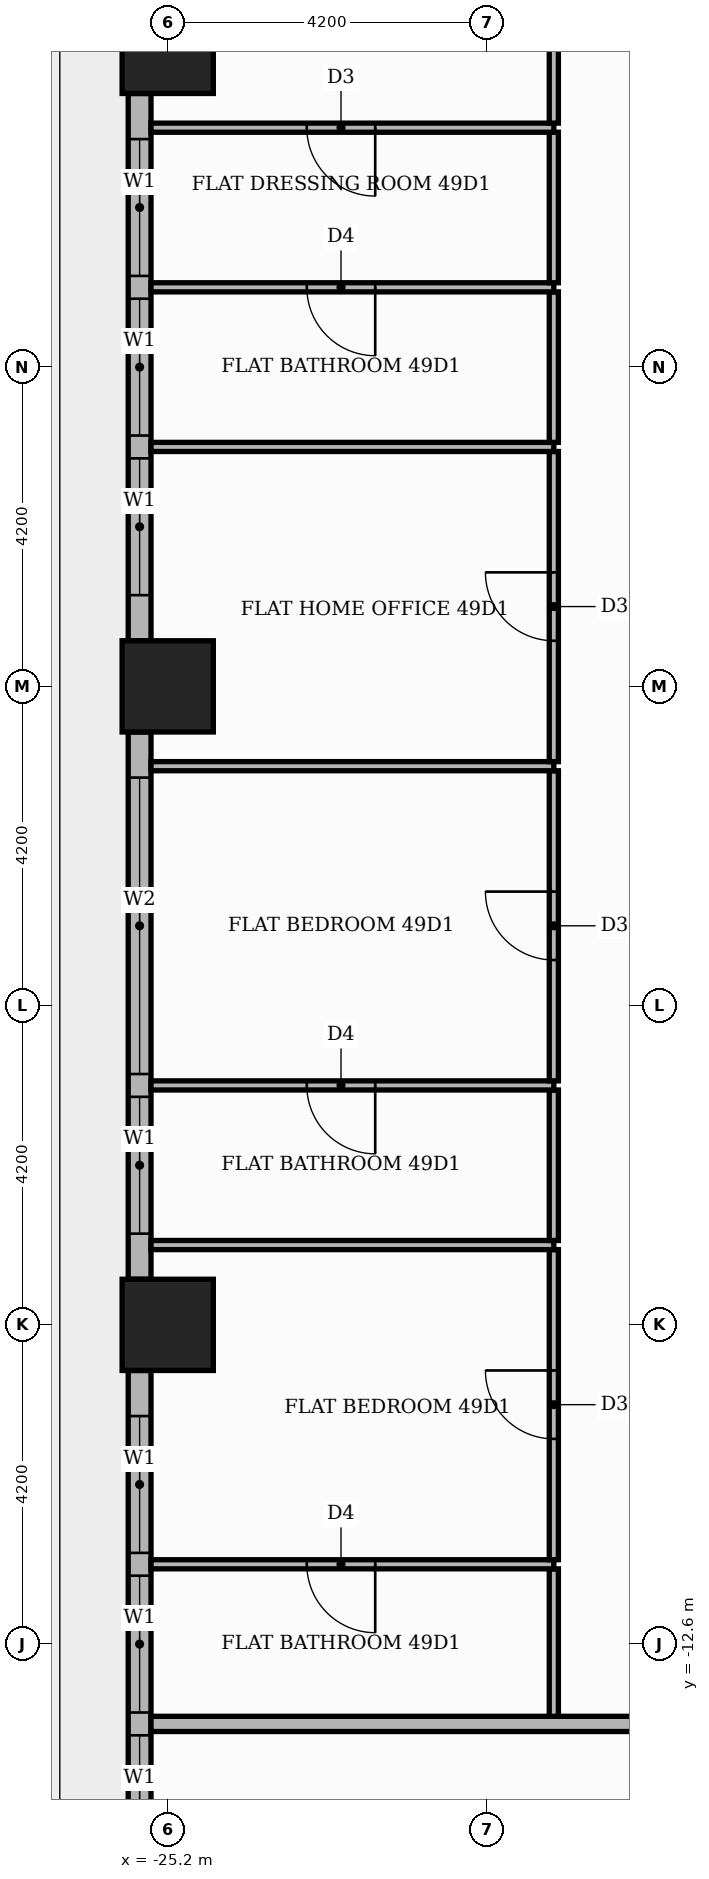
"""IFC4 building model, lengths in metres.
Left out: names, types, materials, properties, quantities, classifications, styles, units other than length and angle.
Written with IfcOpenShell. Run it as: python <this file> out.ifc"""

import sys

from ifc_helpers import new_model, si_unit, direction, frame, frame_2d, origin, origin_2d, place, context, subcontext, project, spatial, rectangle, extrude, element, fill, save


model = new_model("IFC4")
c1 = context("Model", 3, precision=1e-05, world=origin(), true_north=direction((0.0, 1.0)))
c2 = subcontext(c1, "Body", "Model", "MODEL_VIEW")
j1 = project(units=[si_unit("LENGTHUNIT", "METRE"), si_unit("PLANEANGLEUNIT", "RADIAN")], contexts=[c1])
p1 = place(None, origin())
s1 = spatial("IfcSite", under=j1, at=p1, CompositionType="ELEMENT")
p2 = place(p1, origin())
s2 = spatial("IfcBuilding", under=s1, at=p2, CompositionType="ELEMENT")
p3 = place(p2, frame((0.0, 0.0, 207.9)))
s3 = spatial("IfcBuildingStorey", under=s2, at=p3, CompositionType="ELEMENT", Elevation=207.9)
for number, where, z_axis, x_axis in (
    (1, (-25.2, 0.0, 0.0), (0.0, 0.0, 1.0), (1.0, 0.0, 0.0)),
    (2, (-25.2, -8.4, 0.0), (0.0, 0.0, 1.0), (1.0, 0.0, 0.0)),
    (3, (-25.2, 8.4, 0.0), (0.0, 0.0, 1.0), (1.0, 0.0, 0.0)),
):
    element("IfcColumn", number, at=place(p3, frame(where, z_axis=z_axis, x_axis=x_axis)), inside=s3, PredefinedType="COLUMN", context=c2, shape_type="SweptSolid", body=[
        extrude(rectangle(XDim=1.2, YDim=1.2, at=origin_2d()), origin(), (0.0, 0.0, 1.0), 3.9),
    ])
p4 = place(p3, frame((-25.57, 7.8, 0.0), z_axis=(0.0, 0.0, 1.0), x_axis=(0.0, -1.0, 0.0)))
e4 = element("IfcWall", 4, at=p4, inside=s3, PredefinedType="STANDARD", context=c2, shape_type="SweptSolid", body=[
    extrude(rectangle(XDim=7.2, YDim=0.3, at=frame_2d((3.6, 0.0))), origin(), (0.0, 0.0, 1.0), 3.48),
])
p5 = place(p4, frame((0.6, 0.0, 0.9)))
e5 = element("IfcOpeningElement", 5, at=p5, cuts=e4, PredefinedType="OPENING", context=c2, shape_type="SweptSolid", body=[
    extrude(rectangle(XDim=1.8, YDim=2.1, at=frame_2d((0.9, 1.05))), frame((0.0, 0.16, 0.0), z_axis=(0.0, -1.0, 0.0), x_axis=(1.0, 0.0, 0.0)), (0.0, 0.0, 1.0), 0.32),
])
p6 = place(p4, frame((2.7, 0.0, 0.9)))
e6 = element("IfcOpeningElement", 6, at=p6, cuts=e4, PredefinedType="OPENING", context=c2, shape_type="SweptSolid", body=[
    extrude(rectangle(XDim=1.8, YDim=2.1, at=frame_2d((0.9, 1.05))), frame((0.0, 0.16, 0.0), z_axis=(0.0, -1.0, 0.0), x_axis=(1.0, 0.0, 0.0)), (0.0, 0.0, 1.0), 0.32),
])
p7 = place(p4, frame((4.8, 0.0, 0.9)))
e7 = element("IfcOpeningElement", 7, at=p7, cuts=e4, PredefinedType="OPENING", context=c2, shape_type="SweptSolid", body=[
    extrude(rectangle(XDim=1.8, YDim=2.1, at=frame_2d((0.9, 1.05))), frame((0.0, 0.16, 0.0), z_axis=(0.0, -1.0, 0.0), x_axis=(1.0, 0.0, 0.0)), (0.0, 0.0, 1.0), 0.32),
])
p8 = place(p3, frame((-25.57, -0.6, 0.0), z_axis=(0.0, 0.0, 1.0), x_axis=(0.0, -1.0, 0.0)))
e8 = element("IfcWall", 8, at=p8, inside=s3, PredefinedType="STANDARD", context=c2, shape_type="SweptSolid", body=[
    extrude(rectangle(XDim=7.2, YDim=0.3, at=frame_2d((3.6, 0.0))), origin(), (0.0, 0.0, 1.0), 3.48),
])
p9 = place(p8, frame((0.6, 0.0, 0.9)))
e9 = element("IfcOpeningElement", 9, at=p9, cuts=e8, PredefinedType="OPENING", context=c2, shape_type="SweptSolid", body=[
    extrude(rectangle(XDim=3.9, YDim=2.1, at=frame_2d((1.95, 1.05))), frame((0.0, 0.16, 0.0), z_axis=(0.0, -1.0, 0.0), x_axis=(1.0, 0.0, 0.0)), (0.0, 0.0, 1.0), 0.32),
])
p10 = place(p8, frame((4.8, 0.0, 0.9)))
e10 = element("IfcOpeningElement", 10, at=p10, cuts=e8, PredefinedType="OPENING", context=c2, shape_type="SweptSolid", body=[
    extrude(rectangle(XDim=1.8, YDim=2.1, at=frame_2d((0.9, 1.05))), frame((0.0, 0.16, 0.0), z_axis=(0.0, -1.0, 0.0), x_axis=(1.0, 0.0, 0.0)), (0.0, 0.0, 1.0), 0.32),
])
p11 = place(p3, frame((-25.57, -9.0, 0.0), z_axis=(0.0, 0.0, 1.0), x_axis=(0.0, -1.0, 0.0)))
e11 = element("IfcWall", 11, at=p11, inside=s3, PredefinedType="STANDARD", context=c2, shape_type="SweptSolid", body=[
    extrude(rectangle(XDim=7.2, YDim=0.3, at=frame_2d((3.6, 0.0))), origin(), (0.0, 0.0, 1.0), 3.48),
])
p12 = place(p11, frame((0.6, 0.0, 0.9)))
e12 = element("IfcOpeningElement", 12, at=p12, cuts=e11, PredefinedType="OPENING", context=c2, shape_type="SweptSolid", body=[
    extrude(rectangle(XDim=1.8, YDim=2.1, at=frame_2d((0.9, 1.05))), frame((0.0, 0.16, 0.0), z_axis=(0.0, -1.0, 0.0), x_axis=(1.0, 0.0, 0.0)), (0.0, 0.0, 1.0), 0.32),
])
p13 = place(p11, frame((2.7, 0.0, 0.9)))
e13 = element("IfcOpeningElement", 13, at=p13, cuts=e11, PredefinedType="OPENING", context=c2, shape_type="SweptSolid", body=[
    extrude(rectangle(XDim=1.8, YDim=2.1, at=frame_2d((0.9, 1.05))), frame((0.0, 0.16, 0.0), z_axis=(0.0, -1.0, 0.0), x_axis=(1.0, 0.0, 0.0)), (0.0, 0.0, 1.0), 0.32),
])
p14 = place(p11, frame((4.8, 0.0, 0.9)))
e14 = element("IfcOpeningElement", 14, at=p14, cuts=e11, PredefinedType="OPENING", context=c2, shape_type="SweptSolid", body=[
    extrude(rectangle(XDim=1.8, YDim=2.1, at=frame_2d((0.9, 1.05))), frame((0.0, 0.16, 0.0), z_axis=(0.0, -1.0, 0.0), x_axis=(1.0, 0.0, 0.0)), (0.0, 0.0, 1.0), 0.32),
])
p15 = place(p3, frame((-25.42, -13.65, 0.0), z_axis=(0.0, 0.0, 1.0), x_axis=(1.0, 0.0, 0.0)))
e15 = element("IfcWall", 15, at=p15, inside=s3, PredefinedType="PARTITIONING", context=c2, shape_type="SweptSolid", body=[
    extrude(rectangle(XDim=39.07, YDim=0.2, at=frame_2d((19.535, 0.0))), origin(), (0.0, 0.0, 1.0), 3.48),
])
p16 = place(p15, frame((13.32, 0.0, 0.0)))
e16 = element("IfcOpeningElement", 16, at=p16, cuts=e15, PredefinedType="OPENING", context=c2, shape_type="SweptSolid", body=[
    extrude(rectangle(XDim=1.1, YDim=2.4, at=frame_2d((0.55, 1.2))), frame((0.0, 0.11, 0.0), z_axis=(0.0, -1.0, 0.0), x_axis=(1.0, 0.0, 0.0)), (0.0, 0.0, 1.0), 0.22),
])
p17 = place(p15, frame((23.82, 0.0, 0.0)))
e17 = element("IfcOpeningElement", 17, at=p17, cuts=e15, PredefinedType="OPENING", context=c2, shape_type="SweptSolid", body=[
    extrude(rectangle(XDim=1.1, YDim=2.4, at=frame_2d((0.55, 1.2))), frame((0.0, 0.11, 0.0), z_axis=(0.0, -1.0, 0.0), x_axis=(1.0, 0.0, 0.0)), (0.0, 0.0, 1.0), 0.22),
])
p18 = place(p3, frame((-20.12, -13.55, 0.0), z_axis=(0.0, 0.0, 1.0), x_axis=(0.0, 1.0, 0.0)))
e18 = element("IfcWall", 18, at=p18, inside=s3, PredefinedType="PARTITIONING", context=c2, shape_type="SweptSolid", body=[
    extrude(rectangle(XDim=1.94, YDim=0.12, at=frame_2d((0.97, 0.0))), origin(), (0.0, 0.0, 1.0), 3.48),
])
p19 = place(p3, frame((-25.42, -11.55, 0.0), z_axis=(0.0, 0.0, 1.0), x_axis=(1.0, 0.0, 0.0)))
e19 = element("IfcWall", 19, at=p19, inside=s3, PredefinedType="PARTITIONING", context=c2, shape_type="SweptSolid", body=[
    extrude(rectangle(XDim=5.3, YDim=0.12, at=frame_2d((2.65, 0.0))), origin(), (0.0, 0.0, 1.0), 3.48),
])
p20 = place(p19, frame((2.05, 0.0, 0.0)))
e20 = element("IfcOpeningElement", 20, at=p20, cuts=e19, PredefinedType="OPENING", context=c2, shape_type="SweptSolid", body=[
    extrude(rectangle(XDim=0.9, YDim=2.1, at=frame_2d((0.45, 1.05))), frame((0.0, 0.07, 0.0), z_axis=(0.0, -1.0, 0.0), x_axis=(1.0, 0.0, 0.0)), (0.0, 0.0, 1.0), 0.14),
])
p21 = place(p3, frame((-20.12, -11.49, 0.0), z_axis=(0.0, 0.0, 1.0), x_axis=(0.0, 1.0, 0.0)))
e21 = element("IfcWall", 21, at=p21, inside=s3, PredefinedType="PARTITIONING", context=c2, shape_type="SweptSolid", body=[
    extrude(rectangle(XDim=4.08, YDim=0.12, at=frame_2d((2.04, 0.0))), origin(), (0.0, 0.0, 1.0), 3.48),
])
p22 = place(p21, frame((1.59, 0.0, 0.0)))
e22 = element("IfcOpeningElement", 22, at=p22, cuts=e21, PredefinedType="OPENING", context=c2, shape_type="SweptSolid", body=[
    extrude(rectangle(XDim=0.9, YDim=2.1, at=frame_2d((0.45, 1.05))), frame((0.0, 0.07, 0.0), z_axis=(0.0, -1.0, 0.0), x_axis=(1.0, 0.0, 0.0)), (0.0, 0.0, 1.0), 0.14),
])
p23 = place(p3, frame((-25.42, -7.35, 0.0), z_axis=(0.0, 0.0, 1.0), x_axis=(1.0, 0.0, 0.0)))
e23 = element("IfcWall", 23, at=p23, inside=s3, PredefinedType="PARTITIONING", context=c2, shape_type="SweptSolid", body=[
    extrude(rectangle(XDim=5.3, YDim=0.12, at=frame_2d((2.65, 0.0))), origin(), (0.0, 0.0, 1.0), 3.48),
])
p24 = place(p3, frame((-20.12, -7.29, 0.0), z_axis=(0.0, 0.0, 1.0), x_axis=(0.0, 1.0, 0.0)))
e24 = element("IfcWall", 24, at=p24, inside=s3, PredefinedType="PARTITIONING", context=c2, shape_type="SweptSolid", body=[
    extrude(rectangle(XDim=1.98, YDim=0.12, at=frame_2d((0.99, 0.0))), origin(), (0.0, 0.0, 1.0), 3.48),
])
p25 = place(p3, frame((-25.42, -5.25, 0.0), z_axis=(0.0, 0.0, 1.0), x_axis=(1.0, 0.0, 0.0)))
e25 = element("IfcWall", 25, at=p25, inside=s3, PredefinedType="PARTITIONING", context=c2, shape_type="SweptSolid", body=[
    extrude(rectangle(XDim=5.3, YDim=0.12, at=frame_2d((2.65, 0.0))), origin(), (0.0, 0.0, 1.0), 3.48),
])
p26 = place(p25, frame((2.05, 0.0, 0.0)))
e26 = element("IfcOpeningElement", 26, at=p26, cuts=e25, PredefinedType="OPENING", context=c2, shape_type="SweptSolid", body=[
    extrude(rectangle(XDim=0.9, YDim=2.1, at=frame_2d((0.45, 1.05))), frame((0.0, 0.07, 0.0), z_axis=(0.0, -1.0, 0.0), x_axis=(1.0, 0.0, 0.0)), (0.0, 0.0, 1.0), 0.14),
])
p27 = place(p3, frame((-20.12, -5.19, 0.0), z_axis=(0.0, 0.0, 1.0), x_axis=(0.0, 1.0, 0.0)))
e27 = element("IfcWall", 27, at=p27, inside=s3, PredefinedType="PARTITIONING", context=c2, shape_type="SweptSolid", body=[
    extrude(rectangle(XDim=4.08, YDim=0.12, at=frame_2d((2.04, 0.0))), origin(), (0.0, 0.0, 1.0), 3.48),
])
p28 = place(p27, frame((1.59, 0.0, 0.0)))
e28 = element("IfcOpeningElement", 28, at=p28, cuts=e27, PredefinedType="OPENING", context=c2, shape_type="SweptSolid", body=[
    extrude(rectangle(XDim=0.9, YDim=2.1, at=frame_2d((0.45, 1.05))), frame((0.0, 0.07, 0.0), z_axis=(0.0, -1.0, 0.0), x_axis=(1.0, 0.0, 0.0)), (0.0, 0.0, 1.0), 0.14),
])
p29 = place(p3, frame((-25.42, -1.05, 0.0), z_axis=(0.0, 0.0, 1.0), x_axis=(1.0, 0.0, 0.0)))
e29 = element("IfcWall", 29, at=p29, inside=s3, PredefinedType="PARTITIONING", context=c2, shape_type="SweptSolid", body=[
    extrude(rectangle(XDim=5.3, YDim=0.12, at=frame_2d((2.65, 0.0))), origin(), (0.0, 0.0, 1.0), 3.48),
])
p30 = place(p3, frame((-20.12, -0.99, 0.0), z_axis=(0.0, 0.0, 1.0), x_axis=(0.0, 1.0, 0.0)))
e30 = element("IfcWall", 30, at=p30, inside=s3, PredefinedType="PARTITIONING", context=c2, shape_type="SweptSolid", body=[
    extrude(rectangle(XDim=4.08, YDim=0.12, at=frame_2d((2.04, 0.0))), origin(), (0.0, 0.0, 1.0), 3.48),
])
p31 = place(p30, frame((1.59, 0.0, 0.0)))
e31 = element("IfcOpeningElement", 31, at=p31, cuts=e30, PredefinedType="OPENING", context=c2, shape_type="SweptSolid", body=[
    extrude(rectangle(XDim=0.9, YDim=2.1, at=frame_2d((0.45, 1.05))), frame((0.0, 0.07, 0.0), z_axis=(0.0, -1.0, 0.0), x_axis=(1.0, 0.0, 0.0)), (0.0, 0.0, 1.0), 0.14),
])
p32 = place(p3, frame((-25.42, 3.15, 0.0), z_axis=(0.0, 0.0, 1.0), x_axis=(1.0, 0.0, 0.0)))
e32 = element("IfcWall", 32, at=p32, inside=s3, PredefinedType="PARTITIONING", context=c2, shape_type="SweptSolid", body=[
    extrude(rectangle(XDim=5.3, YDim=0.12, at=frame_2d((2.65, 0.0))), origin(), (0.0, 0.0, 1.0), 3.48),
])
p33 = place(p3, frame((-20.12, 3.21, 0.0), z_axis=(0.0, 0.0, 1.0), x_axis=(0.0, 1.0, 0.0)))
e33 = element("IfcWall", 33, at=p33, inside=s3, PredefinedType="PARTITIONING", context=c2, shape_type="SweptSolid", body=[
    extrude(rectangle(XDim=1.98, YDim=0.12, at=frame_2d((0.99, 0.0))), origin(), (0.0, 0.0, 1.0), 3.48),
])
p34 = place(p3, frame((-25.42, 5.25, 0.0), z_axis=(0.0, 0.0, 1.0), x_axis=(1.0, 0.0, 0.0)))
e34 = element("IfcWall", 34, at=p34, inside=s3, PredefinedType="PARTITIONING", context=c2, shape_type="SweptSolid", body=[
    extrude(rectangle(XDim=5.3, YDim=0.12, at=frame_2d((2.65, 0.0))), origin(), (0.0, 0.0, 1.0), 3.48),
])
p35 = place(p34, frame((2.05, 0.0, 0.0)))
e35 = element("IfcOpeningElement", 35, at=p35, cuts=e34, PredefinedType="OPENING", context=c2, shape_type="SweptSolid", body=[
    extrude(rectangle(XDim=0.9, YDim=2.1, at=frame_2d((0.45, 1.05))), frame((0.0, 0.07, 0.0), z_axis=(0.0, -1.0, 0.0), x_axis=(1.0, 0.0, 0.0)), (0.0, 0.0, 1.0), 0.14),
])
p36 = place(p3, frame((-20.12, 5.31, 0.0), z_axis=(0.0, 0.0, 1.0), x_axis=(0.0, 1.0, 0.0)))
e36 = element("IfcWall", 36, at=p36, inside=s3, PredefinedType="PARTITIONING", context=c2, shape_type="SweptSolid", body=[
    extrude(rectangle(XDim=1.98, YDim=0.12, at=frame_2d((0.99, 0.0))), origin(), (0.0, 0.0, 1.0), 3.48),
])
p37 = place(p3, frame((-25.42, 7.35, 0.0), z_axis=(0.0, 0.0, 1.0), x_axis=(1.0, 0.0, 0.0)))
e37 = element("IfcWall", 37, at=p37, inside=s3, PredefinedType="PARTITIONING", context=c2, shape_type="SweptSolid", body=[
    extrude(rectangle(XDim=5.3, YDim=0.12, at=frame_2d((2.65, 0.0))), origin(), (0.0, 0.0, 1.0), 3.48),
])
p38 = place(p37, frame((2.05, 0.0, 0.0)))
e38 = element("IfcOpeningElement", 38, at=p38, cuts=e37, PredefinedType="OPENING", context=c2, shape_type="SweptSolid", body=[
    extrude(rectangle(XDim=0.9, YDim=2.1, at=frame_2d((0.45, 1.05))), frame((0.0, 0.07, 0.0), z_axis=(0.0, -1.0, 0.0), x_axis=(1.0, 0.0, 0.0)), (0.0, 0.0, 1.0), 0.14),
])
p39 = place(p3, frame((-20.12, 7.41, 0.0), z_axis=(0.0, 0.0, 1.0), x_axis=(0.0, 1.0, 0.0)))
e39 = element("IfcWall", 39, at=p39, inside=s3, PredefinedType="PARTITIONING", context=c2, shape_type="SweptSolid", body=[
    extrude(rectangle(XDim=6.18, YDim=0.12, at=frame_2d((3.09, 0.0))), origin(), (0.0, 0.0, 1.0), 3.48),
])
p40 = place(p39, frame((2.64, 0.0, 0.0)))
e40 = element("IfcOpeningElement", 40, at=p40, cuts=e39, PredefinedType="OPENING", context=c2, shape_type="SweptSolid", body=[
    extrude(rectangle(XDim=0.9, YDim=2.1, at=frame_2d((0.45, 1.05))), frame((0.0, 0.07, 0.0), z_axis=(0.0, -1.0, 0.0), x_axis=(1.0, 0.0, 0.0)), (0.0, 0.0, 1.0), 0.14),
])
p41 = place(p5, origin())
e41 = element("IfcWindow", 41, at=p41, inside=s3, PartitioningType="SINGLE_PANEL", PredefinedType="WINDOW", context=c2, shape_type="SweptSolid", body=[
    extrude(rectangle(XDim=1.8, YDim=2.1, at=frame_2d((0.9, 1.05))), frame((0.0, 0.03, 0.0), z_axis=(0.0, -1.0, 0.0), x_axis=(1.0, 0.0, 0.0)), (0.0, 0.0, 1.0), 0.06),
])
fill(e5, e41)
p42 = place(p6, origin())
e42 = element("IfcWindow", 42, at=p42, inside=s3, PartitioningType="SINGLE_PANEL", PredefinedType="WINDOW", context=c2, shape_type="SweptSolid", body=[
    extrude(rectangle(XDim=1.8, YDim=2.1, at=frame_2d((0.9, 1.05))), frame((0.0, 0.03, 0.0), z_axis=(0.0, -1.0, 0.0), x_axis=(1.0, 0.0, 0.0)), (0.0, 0.0, 1.0), 0.06),
])
fill(e6, e42)
p43 = place(p7, origin())
e43 = element("IfcWindow", 43, at=p43, inside=s3, PartitioningType="SINGLE_PANEL", PredefinedType="WINDOW", context=c2, shape_type="SweptSolid", body=[
    extrude(rectangle(XDim=1.8, YDim=2.1, at=frame_2d((0.9, 1.05))), frame((0.0, 0.03, 0.0), z_axis=(0.0, -1.0, 0.0), x_axis=(1.0, 0.0, 0.0)), (0.0, 0.0, 1.0), 0.06),
])
fill(e7, e43)
p44 = place(p9, origin())
e44 = element("IfcWindow", 44, at=p44, inside=s3, PartitioningType="SINGLE_PANEL", PredefinedType="WINDOW", context=c2, shape_type="SweptSolid", body=[
    extrude(rectangle(XDim=3.9, YDim=2.1, at=frame_2d((1.95, 1.05))), frame((0.0, 0.03, 0.0), z_axis=(0.0, -1.0, 0.0), x_axis=(1.0, 0.0, 0.0)), (0.0, 0.0, 1.0), 0.06),
])
fill(e9, e44)
p45 = place(p10, origin())
e45 = element("IfcWindow", 45, at=p45, inside=s3, PartitioningType="SINGLE_PANEL", PredefinedType="WINDOW", context=c2, shape_type="SweptSolid", body=[
    extrude(rectangle(XDim=1.8, YDim=2.1, at=frame_2d((0.9, 1.05))), frame((0.0, 0.03, 0.0), z_axis=(0.0, -1.0, 0.0), x_axis=(1.0, 0.0, 0.0)), (0.0, 0.0, 1.0), 0.06),
])
fill(e10, e45)
p46 = place(p12, origin())
e46 = element("IfcWindow", 46, at=p46, inside=s3, PartitioningType="SINGLE_PANEL", PredefinedType="WINDOW", context=c2, shape_type="SweptSolid", body=[
    extrude(rectangle(XDim=1.8, YDim=2.1, at=frame_2d((0.9, 1.05))), frame((0.0, 0.03, 0.0), z_axis=(0.0, -1.0, 0.0), x_axis=(1.0, 0.0, 0.0)), (0.0, 0.0, 1.0), 0.06),
])
fill(e12, e46)
p47 = place(p13, origin())
e47 = element("IfcWindow", 47, at=p47, inside=s3, PartitioningType="SINGLE_PANEL", PredefinedType="WINDOW", context=c2, shape_type="SweptSolid", body=[
    extrude(rectangle(XDim=1.8, YDim=2.1, at=frame_2d((0.9, 1.05))), frame((0.0, 0.03, 0.0), z_axis=(0.0, -1.0, 0.0), x_axis=(1.0, 0.0, 0.0)), (0.0, 0.0, 1.0), 0.06),
])
fill(e13, e47)
p48 = place(p14, origin())
e48 = element("IfcWindow", 48, at=p48, inside=s3, PartitioningType="SINGLE_PANEL", PredefinedType="WINDOW", context=c2, shape_type="SweptSolid", body=[
    extrude(rectangle(XDim=1.8, YDim=2.1, at=frame_2d((0.9, 1.05))), frame((0.0, 0.03, 0.0), z_axis=(0.0, -1.0, 0.0), x_axis=(1.0, 0.0, 0.0)), (0.0, 0.0, 1.0), 0.06),
])
fill(e14, e48)
p49 = place(p38, frame((0.9, 0.0, 0.0), z_axis=(0.0, 0.0, 1.0), x_axis=(-1.0, 0.0, 0.0)))
e49 = element("IfcDoor", 49, at=p49, inside=s3, OperationType="SINGLE_SWING_RIGHT", PredefinedType="DOOR", context=c2, shape_type="SweptSolid", body=[
    extrude(rectangle(XDim=0.9, YDim=2.1, at=frame_2d((0.45, 1.05))), frame((0.0, 0.025, 0.0), z_axis=(0.0, -1.0, 0.0), x_axis=(1.0, 0.0, 0.0)), (0.0, 0.0, 1.0), 0.05),
])
fill(e38, e49)
p50 = place(p35, frame((0.9, 0.0, 0.0), z_axis=(0.0, 0.0, 1.0), x_axis=(-1.0, 0.0, 0.0)))
e50 = element("IfcDoor", 50, at=p50, inside=s3, OperationType="SINGLE_SWING_RIGHT", PredefinedType="DOOR", context=c2, shape_type="SweptSolid", body=[
    extrude(rectangle(XDim=0.9, YDim=2.1, at=frame_2d((0.45, 1.05))), frame((0.0, 0.025, 0.0), z_axis=(0.0, -1.0, 0.0), x_axis=(1.0, 0.0, 0.0)), (0.0, 0.0, 1.0), 0.05),
])
fill(e35, e50)
p51 = place(p31, origin())
e51 = element("IfcDoor", 51, at=p51, inside=s3, OperationType="SINGLE_SWING_RIGHT", PredefinedType="DOOR", context=c2, shape_type="SweptSolid", body=[
    extrude(rectangle(XDim=0.9, YDim=2.1, at=frame_2d((0.45, 1.05))), frame((0.0, 0.025, 0.0), z_axis=(0.0, -1.0, 0.0), x_axis=(1.0, 0.0, 0.0)), (0.0, 0.0, 1.0), 0.05),
])
fill(e31, e51)
p52 = place(p28, origin())
e52 = element("IfcDoor", 52, at=p52, inside=s3, OperationType="SINGLE_SWING_RIGHT", PredefinedType="DOOR", context=c2, shape_type="SweptSolid", body=[
    extrude(rectangle(XDim=0.9, YDim=2.1, at=frame_2d((0.45, 1.05))), frame((0.0, 0.025, 0.0), z_axis=(0.0, -1.0, 0.0), x_axis=(1.0, 0.0, 0.0)), (0.0, 0.0, 1.0), 0.05),
])
fill(e28, e52)
p53 = place(p26, frame((0.9, 0.0, 0.0), z_axis=(0.0, 0.0, 1.0), x_axis=(-1.0, 0.0, 0.0)))
e53 = element("IfcDoor", 53, at=p53, inside=s3, OperationType="SINGLE_SWING_RIGHT", PredefinedType="DOOR", context=c2, shape_type="SweptSolid", body=[
    extrude(rectangle(XDim=0.9, YDim=2.1, at=frame_2d((0.45, 1.05))), frame((0.0, 0.025, 0.0), z_axis=(0.0, -1.0, 0.0), x_axis=(1.0, 0.0, 0.0)), (0.0, 0.0, 1.0), 0.05),
])
fill(e26, e53)
p54 = place(p22, origin())
e54 = element("IfcDoor", 54, at=p54, inside=s3, OperationType="SINGLE_SWING_RIGHT", PredefinedType="DOOR", context=c2, shape_type="SweptSolid", body=[
    extrude(rectangle(XDim=0.9, YDim=2.1, at=frame_2d((0.45, 1.05))), frame((0.0, 0.025, 0.0), z_axis=(0.0, -1.0, 0.0), x_axis=(1.0, 0.0, 0.0)), (0.0, 0.0, 1.0), 0.05),
])
fill(e22, e54)
p55 = place(p20, frame((0.9, 0.0, 0.0), z_axis=(0.0, 0.0, 1.0), x_axis=(-1.0, 0.0, 0.0)))
e55 = element("IfcDoor", 55, at=p55, inside=s3, OperationType="SINGLE_SWING_RIGHT", PredefinedType="DOOR", context=c2, shape_type="SweptSolid", body=[
    extrude(rectangle(XDim=0.9, YDim=2.1, at=frame_2d((0.45, 1.05))), frame((0.0, 0.025, 0.0), z_axis=(0.0, -1.0, 0.0), x_axis=(1.0, 0.0, 0.0)), (0.0, 0.0, 1.0), 0.05),
])
fill(e20, e55)
save(model, sys.argv[1])
